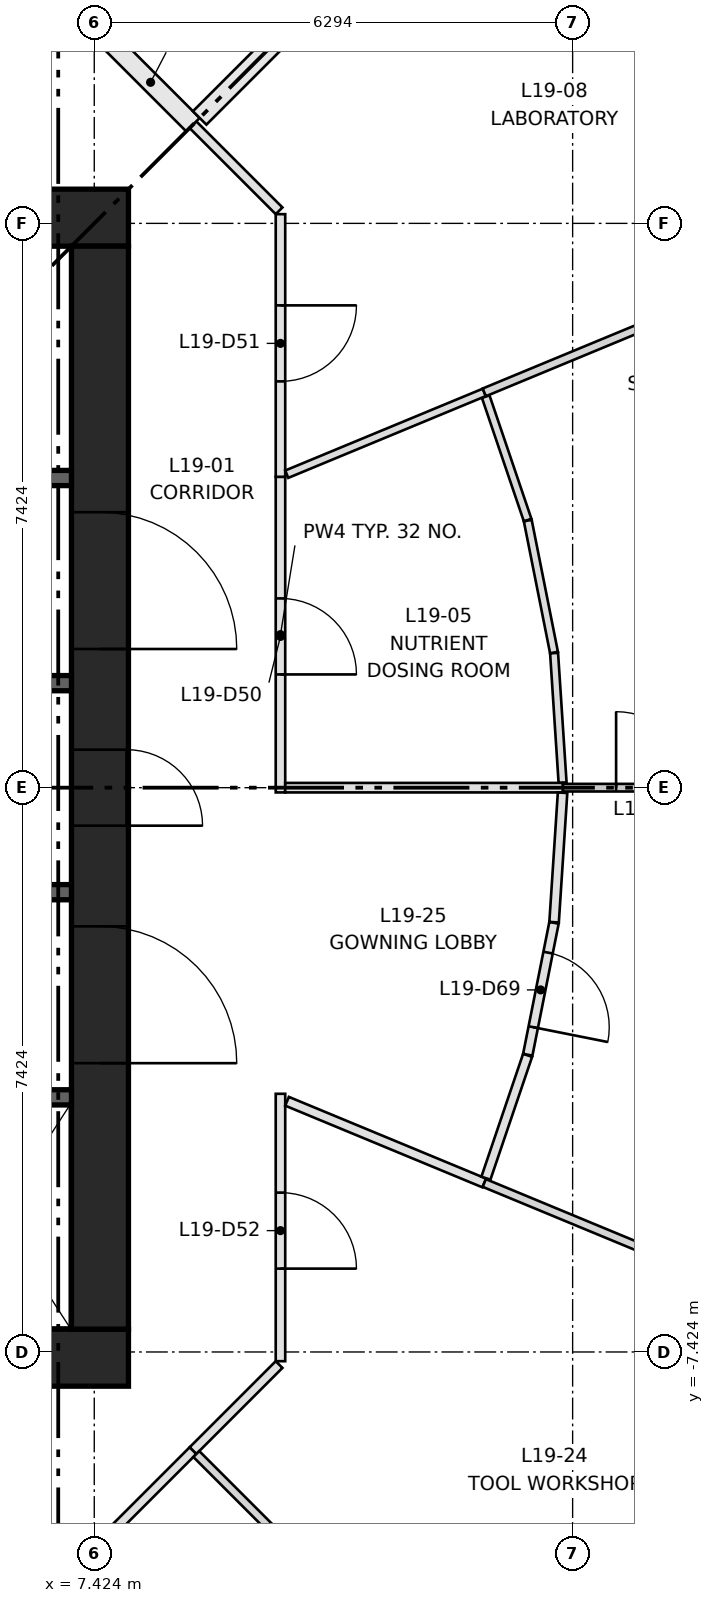
"""IFC4 building model, lengths in metres.
Left out: names, types, materials, properties, quantities, classifications, styles, units other than length and angle.
Written with IfcOpenShell. Run it as: python <this file> out.ifc"""

import sys

from ifc_helpers import new_model, si_unit, direction, frame, frame_2d, origin, place, context, subcontext, project, spatial, rectangle, extrude, element, fill, save


model = new_model("IFC4")
c1 = context("Model", 3, precision=1e-05, world=origin(), true_north=direction((0.0, 1.0)))
c2 = subcontext(c1, "Body", "Model", "MODEL_VIEW")
j1 = project(units=[si_unit("LENGTHUNIT", "METRE"), si_unit("PLANEANGLEUNIT", "RADIAN")], contexts=[c1])
p1 = place(None, origin())
s1 = spatial("IfcSite", under=j1, at=p1, CompositionType="ELEMENT")
p2 = place(p1, origin())
s2 = spatial("IfcBuilding", under=s1, at=p2, CompositionType="ELEMENT")
p3 = place(p2, frame((0.0, 0.0, 76.4)))
s3 = spatial("IfcBuildingStorey", under=s2, at=p3, CompositionType="ELEMENT", Elevation=76.4)
for number, where, z_axis, x_axis in (
    (1, (-7.874, -7.499, 0.0), (0.0, 0.0, 1.0), (1.0, 0.0, 0.0)),
    (2, (-7.874, 7.499, 0.0), (0.0, 0.0, 1.0), (1.0, 0.0, 0.0)),
):
    element("IfcWall", number, at=place(p3, frame(where, z_axis=z_axis, x_axis=x_axis)), inside=s3, PredefinedType="SHEAR", context=c2, shape_type="SweptSolid", body=[
        extrude(rectangle(XDim=15.748, YDim=0.75, at=frame_2d((7.874, 0.0))), origin(), (0.0, 0.0, 1.0), 3.65),
    ])
p4 = place(p3, frame((7.499, -7.124, 0.0), z_axis=(0.0, 0.0, 1.0), x_axis=(0.0, 1.0, 0.0)))
e3 = element("IfcWall", 3, at=p4, inside=s3, PredefinedType="SHEAR", context=c2, shape_type="SweptSolid", body=[
    extrude(rectangle(XDim=14.248, YDim=0.75, at=frame_2d((7.124, 0.0))), origin(), (0.0, 0.0, 1.0), 3.65),
])
p5 = place(p4, frame((6.624, 0.0, 0.0)))
e4 = element("IfcOpeningElement", 4, at=p5, cuts=e3, PredefinedType="OPENING", context=c2, shape_type="SweptSolid", body=[
    extrude(rectangle(XDim=1.0, YDim=2.1, at=frame_2d((0.5, 1.05))), frame((0.0, 0.385, 0.0), z_axis=(0.0, -1.0, 0.0), x_axis=(1.0, 0.0, 0.0)), (0.0, 0.0, 1.0), 0.77),
])
p6 = place(p4, frame((3.5, 0.0, 0.0)))
e5 = element("IfcOpeningElement", 5, at=p6, cuts=e3, PredefinedType="OPENING", context=c2, shape_type="SweptSolid", body=[
    extrude(rectangle(XDim=1.8, YDim=2.1, at=frame_2d((0.9, 1.05))), frame((0.0, 0.385, 0.0), z_axis=(0.0, -1.0, 0.0), x_axis=(1.0, 0.0, 0.0)), (0.0, 0.0, 1.0), 0.77),
])
p7 = place(p4, frame((8.948, 0.0, 0.0)))
e6 = element("IfcOpeningElement", 6, at=p7, cuts=e3, PredefinedType="OPENING", context=c2, shape_type="SweptSolid", body=[
    extrude(rectangle(XDim=1.8, YDim=2.1, at=frame_2d((0.9, 1.05))), frame((0.0, 0.385, 0.0), z_axis=(0.0, -1.0, 0.0), x_axis=(1.0, 0.0, 0.0)), (0.0, 0.0, 1.0), 0.77),
])
p8 = place(p3, frame((-7.124, -4.074, 0.0), z_axis=(0.0, 0.0, 1.0), x_axis=(1.0, 0.0, 0.0)))
e7 = element("IfcWall", 7, at=p8, inside=s3, PredefinedType="SHEAR", context=c2, shape_type="SweptSolid", body=[
    extrude(rectangle(XDim=14.248, YDim=0.2, at=frame_2d((7.124, 0.0))), origin(), (0.0, 0.0, 1.0), 3.3),
])
p9 = place(p8, frame((1.069, 0.0, 0.0)))
e8 = element("IfcOpeningElement", 8, at=p9, cuts=e7, PredefinedType="OPENING", context=c2, shape_type="SweptSolid", body=[
    extrude(rectangle(XDim=1.1, YDim=2.1, at=frame_2d((0.55, 1.05))), frame((0.0, 0.11, 0.0), z_axis=(0.0, -1.0, 0.0), x_axis=(1.0, 0.0, 0.0)), (0.0, 0.0, 1.0), 0.22),
])
p10 = place(p8, frame((4.206, 0.0, 0.0)))
e9 = element("IfcOpeningElement", 9, at=p10, cuts=e7, PredefinedType="OPENING", context=c2, shape_type="SweptSolid", body=[
    extrude(rectangle(XDim=1.1, YDim=2.1, at=frame_2d((0.55, 1.05))), frame((0.0, 0.11, 0.0), z_axis=(0.0, -1.0, 0.0), x_axis=(1.0, 0.0, 0.0)), (0.0, 0.0, 1.0), 0.22),
])
p11 = place(p8, frame((6.808, 0.0, 0.0)))
e10 = element("IfcOpeningElement", 10, at=p11, cuts=e7, PredefinedType="OPENING", context=c2, shape_type="SweptSolid", body=[
    extrude(rectangle(XDim=1.0, YDim=2.1, at=frame_2d((0.5, 1.05))), frame((0.0, 0.11, 0.0), z_axis=(0.0, -1.0, 0.0), x_axis=(1.0, 0.0, 0.0)), (0.0, 0.0, 1.0), 0.22),
])
p12 = place(p8, frame((8.777, 0.0, 0.0)))
e11 = element("IfcOpeningElement", 11, at=p12, cuts=e7, PredefinedType="OPENING", context=c2, shape_type="SweptSolid", body=[
    extrude(rectangle(XDim=1.0, YDim=2.1, at=frame_2d((0.5, 1.05))), frame((0.0, 0.11, 0.0), z_axis=(0.0, -1.0, 0.0), x_axis=(1.0, 0.0, 0.0)), (0.0, 0.0, 1.0), 0.22),
])
p13 = place(p8, frame((10.745, 0.0, 0.0)))
e12 = element("IfcOpeningElement", 12, at=p13, cuts=e7, PredefinedType="OPENING", context=c2, shape_type="SweptSolid", body=[
    extrude(rectangle(XDim=1.0, YDim=2.1, at=frame_2d((0.5, 1.05))), frame((0.0, 0.11, 0.0), z_axis=(0.0, -1.0, 0.0), x_axis=(1.0, 0.0, 0.0)), (0.0, 0.0, 1.0), 0.22),
])
p14 = place(p8, frame((12.714, 0.0, 0.0)))
e13 = element("IfcOpeningElement", 13, at=p14, cuts=e7, PredefinedType="OPENING", context=c2, shape_type="SweptSolid", body=[
    extrude(rectangle(XDim=1.0, YDim=2.1, at=frame_2d((0.5, 1.05))), frame((0.0, 0.11, 0.0), z_axis=(0.0, -1.0, 0.0), x_axis=(1.0, 0.0, 0.0)), (0.0, 0.0, 1.0), 0.22),
])
p15 = place(p3, frame((0.0, 4.074, 0.0), z_axis=(0.0, 0.0, 1.0), x_axis=(1.0, 0.0, 0.0)))
e14 = element("IfcWall", 14, at=p15, inside=s3, PredefinedType="SHEAR", context=c2, shape_type="SweptSolid", body=[
    extrude(rectangle(XDim=7.124, YDim=0.2, at=frame_2d((3.562, 0.0))), origin(), (0.0, 0.0, 1.0), 3.3),
])
p16 = place(p15, frame((0.753, 0.0, 0.0)))
e15 = element("IfcOpeningElement", 15, at=p16, cuts=e14, PredefinedType="OPENING", context=c2, shape_type="SweptSolid", body=[
    extrude(rectangle(XDim=1.0, YDim=2.1, at=frame_2d((0.5, 1.05))), frame((0.0, 0.11, 0.0), z_axis=(0.0, -1.0, 0.0), x_axis=(1.0, 0.0, 0.0)), (0.0, 0.0, 1.0), 0.22),
])
p17 = place(p15, frame((2.685, 0.0, 0.0)))
e16 = element("IfcOpeningElement", 16, at=p17, cuts=e14, PredefinedType="OPENING", context=c2, shape_type="SweptSolid", body=[
    extrude(rectangle(XDim=0.95, YDim=2.1, at=frame_2d((0.475, 1.05))), frame((0.0, 0.11, 0.0), z_axis=(0.0, -1.0, 0.0), x_axis=(1.0, 0.0, 0.0)), (0.0, 0.0, 1.0), 0.22),
])
p18 = place(p15, frame((4.06, 0.0, 0.0)))
e17 = element("IfcOpeningElement", 17, at=p18, cuts=e14, PredefinedType="OPENING", context=c2, shape_type="SweptSolid", body=[
    extrude(rectangle(XDim=1.0, YDim=2.1, at=frame_2d((0.5, 1.05))), frame((0.0, 0.11, 0.0), z_axis=(0.0, -1.0, 0.0), x_axis=(1.0, 0.0, 0.0)), (0.0, 0.0, 1.0), 0.22),
])
p19 = place(p15, frame((5.79, 0.0, 0.0)))
e18 = element("IfcOpeningElement", 18, at=p19, cuts=e14, PredefinedType="OPENING", context=c2, shape_type="SweptSolid", body=[
    extrude(rectangle(XDim=0.8, YDim=2.1, at=frame_2d((0.4, 1.05))), frame((0.0, 0.11, 0.0), z_axis=(0.0, -1.0, 0.0), x_axis=(1.0, 0.0, 0.0)), (0.0, 0.0, 1.0), 0.22),
])
for number, where, z_axis, x_axis in (
    (19, (4.374, -1.375, 0.0), (0.0, 0.0, 1.0), (1.0, 0.0, 0.0)),
    (20, (4.374, 1.375, 0.0), (0.0, 0.0, 1.0), (1.0, 0.0, 0.0)),
):
    element("IfcWall", number, at=place(p3, frame(where, z_axis=z_axis, x_axis=x_axis)), inside=s3, PredefinedType="SHEAR", context=c2, shape_type="SweptSolid", body=[
        extrude(rectangle(XDim=2.75, YDim=0.2, at=frame_2d((1.375, 0.0))), origin(), (0.0, 0.0, 1.0), 3.3),
    ])
p20 = place(p3, frame((9.874, 4.09, 0.0), z_axis=(0.0, 0.0, 1.0), x_axis=(0.0, -1.0, 0.0)))
e21 = element("IfcWall", 21, at=p20, inside=s3, PredefinedType="PARTITIONING", context=c2, shape_type="SweptSolid", body=[
    extrude(rectangle(XDim=4.152, YDim=0.125, at=frame_2d((2.076, 0.0))), origin(), (0.0, 0.0, 1.0), 3.3),
])
p21 = place(p20, frame((1.6, 0.0, 0.0)))
e22 = element("IfcOpeningElement", 22, at=p21, cuts=e21, PredefinedType="OPENING", context=c2, shape_type="SweptSolid", body=[
    extrude(rectangle(XDim=1.0, YDim=2.1, at=frame_2d((0.5, 1.05))), frame((0.0, 0.073, 0.0), z_axis=(0.0, -1.0, 0.0), x_axis=(1.0, 0.0, 0.0)), (0.0, 0.0, 1.0), 0.145),
])
p22 = place(p3, frame((8.722, 8.722, 0.0), z_axis=(0.0, 0.0, 1.0), x_axis=(0.70718294931, -0.707030604857, 0.0)))
e23 = element("IfcWall", 23, at=p22, inside=s3, PredefinedType="PARTITIONING", context=c2, shape_type="SweptSolid", body=[
    extrude(rectangle(XDim=1.603, YDim=0.125, at=frame_2d((0.801, 0.0))), origin(), (0.0, 0.0, 1.0), 3.3),
])
p23 = place(p3, frame((9.874, 7.545, 0.0), z_axis=(0.0, 0.0, 1.0), x_axis=(0.0, -1.0, 0.0)))
e24 = element("IfcWall", 24, at=p23, inside=s3, PredefinedType="PARTITIONING", context=c2, shape_type="SweptSolid", body=[
    extrude(rectangle(XDim=3.455, YDim=0.125, at=frame_2d((1.728, 0.0))), origin(), (0.0, 0.0, 1.0), 3.3),
])
p24 = place(p23, frame((1.2, 0.0, 0.0)))
e25 = element("IfcOpeningElement", 25, at=p24, cuts=e24, PredefinedType="OPENING", context=c2, shape_type="SweptSolid", body=[
    extrude(rectangle(XDim=1.0, YDim=2.1, at=frame_2d((0.5, 1.05))), frame((0.0, 0.073, 0.0), z_axis=(0.0, -1.0, 0.0), x_axis=(1.0, 0.0, 0.0)), (0.0, 0.0, 1.0), 0.145),
])
p25 = place(p3, frame((9.856, -7.589, 0.0), z_axis=(0.0, 0.0, 1.0), x_axis=(-0.70718294931, -0.707030604857, 0.0)))
e26 = element("IfcWall", 26, at=p25, inside=s3, PredefinedType="PARTITIONING", context=c2, shape_type="SweptSolid", body=[
    extrude(rectangle(XDim=1.603, YDim=0.125, at=frame_2d((0.801, 0.0))), origin(), (0.0, 0.0, 1.0), 3.3),
])
p26 = place(p3, frame((9.874, -4.027, 0.0), z_axis=(0.0, 0.0, 1.0), x_axis=(0.0, -1.0, 0.0)))
e27 = element("IfcWall", 27, at=p26, inside=s3, PredefinedType="PARTITIONING", context=c2, shape_type="SweptSolid", body=[
    extrude(rectangle(XDim=3.518, YDim=0.125, at=frame_2d((1.759, 0.0))), origin(), (0.0, 0.0, 1.0), 3.3),
])
p27 = place(p26, frame((1.3, 0.0, 0.0)))
e28 = element("IfcOpeningElement", 28, at=p27, cuts=e27, PredefinedType="OPENING", context=c2, shape_type="SweptSolid", body=[
    extrude(rectangle(XDim=1.0, YDim=2.1, at=frame_2d((0.5, 1.05))), frame((0.0, 0.073, 0.0), z_axis=(0.0, -1.0, 0.0), x_axis=(1.0, 0.0, 0.0)), (0.0, 0.0, 1.0), 0.145),
])
p28 = place(p3, frame((7.608, 9.837, 0.0), z_axis=(0.0, 0.0, 1.0), x_axis=(0.707029353672, -0.707184200224, 0.0)))
e29 = element("IfcWall", 29, at=p28, inside=s3, PredefinedType="PARTITIONING", context=c2, shape_type="SweptSolid", body=[
    extrude(rectangle(XDim=1.577, YDim=0.25, at=frame_2d((0.788, 0.0))), origin(), (0.0, 0.0, 1.0), 3.3),
])
p29 = place(p3, frame((8.722, -8.722, 0.0), z_axis=(0.0, 0.0, 1.0), x_axis=(-0.707030604857, -0.70718294931, 0.0)))
e30 = element("IfcWall", 30, at=p29, inside=s3, PredefinedType="PARTITIONING", context=c2, shape_type="SweptSolid", body=[
    extrude(rectangle(XDim=1.603, YDim=0.125, at=frame_2d((0.801, 0.0))), origin(), (0.0, 0.0, 1.0), 3.3),
])
p30 = place(p3, frame((12.574, 5.145, 0.0), z_axis=(0.0, 0.0, 1.0), x_axis=(0.32147409201, -0.946918374606, 0.0)))
e31 = element("IfcWall", 31, at=p30, inside=s3, PredefinedType="PARTITIONING", context=c2, shape_type="SweptSolid", body=[
    extrude(rectangle(XDim=1.716, YDim=0.105, at=frame_2d((0.858, 0.0))), origin(), (0.0, 0.0, 1.0), 3.3),
])
p31 = place(p3, frame((13.128, 3.514, 0.0), z_axis=(0.0, 0.0, 1.0), x_axis=(0.194975762397, -0.980808060773, 0.0)))
e32 = element("IfcWall", 32, at=p31, inside=s3, PredefinedType="PARTITIONING", context=c2, shape_type="SweptSolid", body=[
    extrude(rectangle(XDim=1.771, YDim=0.105, at=frame_2d((0.885, 0.0))), origin(), (0.0, 0.0, 1.0), 3.3),
])
p32 = place(p3, frame((13.474, 1.771, 0.0), z_axis=(0.0, 0.0, 1.0), x_axis=(0.065456571456, -0.997855419013, 0.0)))
e33 = element("IfcWall", 33, at=p32, inside=s3, PredefinedType="PARTITIONING", context=c2, shape_type="SweptSolid", body=[
    extrude(rectangle(XDim=1.708, YDim=0.105, at=frame_2d((0.854, 0.0))), origin(), (0.0, 0.0, 1.0), 3.3),
])
p33 = place(p3, frame((9.957, 4.124, 0.0), z_axis=(0.0, 0.0, 1.0), x_axis=(0.923858155589, 0.382735036745, 0.0)))
e34 = element("IfcWall", 34, at=p33, inside=s3, PredefinedType="PARTITIONING", context=c2, shape_type="SweptSolid", body=[
    extrude(rectangle(XDim=2.813, YDim=0.105, at=frame_2d((1.406, 0.0))), origin(), (0.0, 0.0, 1.0), 3.3),
])
p34 = place(p3, frame((13.59, 0.0, 0.0), z_axis=(0.0, 0.0, 1.0), x_axis=(-1.0, 0.0, 0.0)))
e35 = element("IfcWall", 35, at=p34, inside=s3, PredefinedType="PARTITIONING", context=c2, shape_type="SweptSolid", body=[
    extrude(rectangle(XDim=3.654, YDim=0.125, at=frame_2d((1.827, 0.0))), origin(), (0.0, 0.0, 1.0), 3.3),
])
p35 = place(p3, frame((12.555, 5.201, 0.0), z_axis=(0.0, 0.0, 1.0), x_axis=(0.923886856779, 0.38266574954, 0.0)))
e36 = element("IfcWall", 36, at=p35, inside=s3, PredefinedType="PARTITIONING", context=c2, shape_type="SweptSolid", body=[
    extrude(rectangle(XDim=4.67, YDim=0.11, at=frame_2d((2.335, 0.0))), origin(), (0.0, 0.0, 1.0), 3.3),
])
p36 = place(p3, frame((13.59, 0.0, 0.0), z_axis=(0.0, 0.0, 1.0), x_axis=(1.0, 0.0, 0.0)))
e37 = element("IfcWall", 37, at=p36, inside=s3, PredefinedType="PARTITIONING", context=c2, shape_type="SweptSolid", body=[
    extrude(rectangle(XDim=4.67, YDim=0.1, at=frame_2d((2.335, 0.0))), origin(), (0.0, 0.0, 1.0), 3.3),
])
p37 = place(p36, frame((0.7, 0.0, 0.0)))
e38 = element("IfcOpeningElement", 38, at=p37, cuts=e37, PredefinedType="OPENING", context=c2, shape_type="SweptSolid", body=[
    extrude(rectangle(XDim=1.0, YDim=2.1, at=frame_2d((0.5, 1.05))), frame((0.0, 0.06, 0.0), z_axis=(0.0, -1.0, 0.0), x_axis=(1.0, 0.0, 0.0)), (0.0, 0.0, 1.0), 0.12),
])
p38 = place(p3, frame((12.912, 12.912, 0.0), z_axis=(0.0, 0.0, 1.0), x_axis=(-0.707106781187, -0.707106781187, 0.0)))
e39 = element("IfcWall", 39, at=p38, inside=s3, PredefinedType="PARTITIONING", context=c2, shape_type="SweptSolid", body=[
    extrude(rectangle(XDim=5.8, YDim=0.25, at=frame_2d((2.9, 0.0))), origin(), (0.0, 0.0, 1.0), 3.3),
])
p39 = place(p3, frame((8.767, -8.767, 0.0), z_axis=(0.0, 0.0, 1.0), x_axis=(0.707106781187, -0.707106781187, 0.0)))
e40 = element("IfcWall", 40, at=p39, inside=s3, PredefinedType="PARTITIONING", context=c2, shape_type="SweptSolid", body=[
    extrude(rectangle(XDim=5.862, YDim=0.11, at=frame_2d((2.931, 0.0))), origin(), (0.0, 0.0, 1.0), 3.3),
])
p40 = place(p3, frame((9.96, -4.126, 0.0), z_axis=(0.0, 0.0, 1.0), x_axis=(0.923869574034, -0.382707473372, 0.0)))
e41 = element("IfcWall", 41, at=p40, inside=s3, PredefinedType="PARTITIONING", context=c2, shape_type="SweptSolid", body=[
    extrude(rectangle(XDim=2.809, YDim=0.125, at=frame_2d((1.404, 0.0))), origin(), (0.0, 0.0, 1.0), 3.3),
])
p41 = place(p3, frame((12.555, -5.201, 0.0), z_axis=(0.0, 0.0, 1.0), x_axis=(0.923886856779, -0.38266574954, 0.0)))
e42 = element("IfcWall", 42, at=p41, inside=s3, PredefinedType="PARTITIONING", context=c2, shape_type="SweptSolid", body=[
    extrude(rectangle(XDim=4.67, YDim=0.11, at=frame_2d((2.335, 0.0))), origin(), (0.0, 0.0, 1.0), 3.3),
])
p42 = place(p3, frame((13.125, -3.521, 0.0), z_axis=(0.0, 0.0, 1.0), x_axis=(-0.321415455279, -0.946938279461, 0.0)))
e43 = element("IfcWall", 43, at=p42, inside=s3, PredefinedType="PARTITIONING", context=c2, shape_type="SweptSolid", body=[
    extrude(rectangle(XDim=1.707, YDim=0.125, at=frame_2d((0.854, 0.0))), origin(), (0.0, 0.0, 1.0), 3.3),
])
p43 = place(p3, frame((13.473, -1.778, 0.0), z_axis=(0.0, 0.0, 1.0), x_axis=(-0.195081294896, -0.980787075966, 0.0)))
e44 = element("IfcWall", 44, at=p43, inside=s3, PredefinedType="PARTITIONING", context=c2, shape_type="SweptSolid", body=[
    extrude(rectangle(XDim=1.77, YDim=0.125, at=frame_2d((0.885, 0.0))), origin(), (0.0, 0.0, 1.0), 3.3),
])
p44 = place(p43, frame((0.4, 0.0, 0.0)))
e45 = element("IfcOpeningElement", 45, at=p44, cuts=e44, PredefinedType="OPENING", context=c2, shape_type="SweptSolid", body=[
    extrude(rectangle(XDim=1.0, YDim=2.1, at=frame_2d((0.5, 1.05))), frame((0.0, 0.073, 0.0), z_axis=(0.0, -1.0, 0.0), x_axis=(1.0, 0.0, 0.0)), (0.0, 0.0, 1.0), 0.145),
])
p45 = place(p3, frame((13.586, -0.067, 0.0), z_axis=(0.0, 0.0, 1.0), x_axis=(-0.06537019983, -0.997861081, 0.0)))
e46 = element("IfcWall", 46, at=p45, inside=s3, PredefinedType="PARTITIONING", context=c2, shape_type="SweptSolid", body=[
    extrude(rectangle(XDim=1.707, YDim=0.125, at=frame_2d((0.854, 0.0))), origin(), (0.0, 0.0, 1.0), 3.3),
])
p46 = place(p5, frame((1.0, 0.0, 0.0), z_axis=(0.0, 0.0, 1.0), x_axis=(-1.0, 0.0, 0.0)))
e47 = element("IfcDoor", 47, at=p46, inside=s3, OperationType="SINGLE_SWING_LEFT", PredefinedType="DOOR", context=c2, shape_type="SweptSolid", body=[
    extrude(rectangle(XDim=1.0, YDim=2.1, at=frame_2d((0.5, 1.05))), frame((0.0, 0.375, 0.0), z_axis=(0.0, -1.0, 0.0), x_axis=(1.0, 0.0, 0.0)), (0.0, 0.0, 1.0), 0.05),
])
fill(e4, e47)
p47 = place(p6, frame((1.8, 0.0, 0.0), z_axis=(0.0, 0.0, 1.0), x_axis=(-1.0, 0.0, 0.0)))
e48 = element("IfcDoor", 48, at=p47, inside=s3, OperationType="DOUBLE_DOOR_SINGLE_SWING", PredefinedType="DOOR", context=c2, shape_type="SweptSolid", body=[
    extrude(rectangle(XDim=1.8, YDim=2.1, at=frame_2d((0.9, 1.05))), frame((0.0, 0.025, 0.0), z_axis=(0.0, -1.0, 0.0), x_axis=(1.0, 0.0, 0.0)), (0.0, 0.0, 1.0), 0.05),
])
fill(e5, e48)
p48 = place(p7, frame((1.8, 0.0, 0.0), z_axis=(0.0, 0.0, 1.0), x_axis=(-1.0, 0.0, 0.0)))
e49 = element("IfcDoor", 49, at=p48, inside=s3, OperationType="DOUBLE_DOOR_SINGLE_SWING", PredefinedType="DOOR", context=c2, shape_type="SweptSolid", body=[
    extrude(rectangle(XDim=1.8, YDim=2.1, at=frame_2d((0.9, 1.05))), frame((0.0, 0.025, 0.0), z_axis=(0.0, -1.0, 0.0), x_axis=(1.0, 0.0, 0.0)), (0.0, 0.0, 1.0), 0.05),
])
fill(e6, e49)
p49 = place(p21, origin())
e50 = element("IfcDoor", 50, at=p49, inside=s3, OperationType="SINGLE_SWING_RIGHT", PredefinedType="DOOR", context=c2, shape_type="SweptSolid", body=[
    extrude(rectangle(XDim=1.0, YDim=2.1, at=frame_2d((0.5, 1.05))), frame((0.0, 0.025, 0.0), z_axis=(0.0, -1.0, 0.0), x_axis=(1.0, 0.0, 0.0)), (0.0, 0.0, 1.0), 0.05),
])
fill(e22, e50)
p50 = place(p24, origin())
e51 = element("IfcDoor", 51, at=p50, inside=s3, OperationType="SINGLE_SWING_LEFT", PredefinedType="DOOR", context=c2, shape_type="SweptSolid", body=[
    extrude(rectangle(XDim=1.0, YDim=2.1, at=frame_2d((0.5, 1.05))), frame((0.0, 0.025, 0.0), z_axis=(0.0, -1.0, 0.0), x_axis=(1.0, 0.0, 0.0)), (0.0, 0.0, 1.0), 0.05),
])
fill(e25, e51)
p51 = place(p27, origin())
e52 = element("IfcDoor", 52, at=p51, inside=s3, OperationType="SINGLE_SWING_RIGHT", PredefinedType="DOOR", context=c2, shape_type="SweptSolid", body=[
    extrude(rectangle(XDim=1.0, YDim=2.1, at=frame_2d((0.5, 1.05))), frame((0.0, 0.025, 0.0), z_axis=(0.0, -1.0, 0.0), x_axis=(1.0, 0.0, 0.0)), (0.0, 0.0, 1.0), 0.05),
])
fill(e28, e52)
p52 = place(p37, origin())
e53 = element("IfcDoor", 53, at=p52, inside=s3, OperationType="SINGLE_SWING_LEFT", PredefinedType="DOOR", context=c2, shape_type="SweptSolid", body=[
    extrude(rectangle(XDim=1.0, YDim=2.1, at=frame_2d((0.5, 1.05))), frame((0.0, 0.025, 0.0), z_axis=(0.0, -1.0, 0.0), x_axis=(1.0, 0.0, 0.0)), (0.0, 0.0, 1.0), 0.05),
])
fill(e38, e53)
p53 = place(p44, origin())
e54 = element("IfcDoor", 54, at=p53, inside=s3, OperationType="SINGLE_SWING_RIGHT", PredefinedType="DOOR", context=c2, shape_type="SweptSolid", body=[
    extrude(rectangle(XDim=1.0, YDim=2.1, at=frame_2d((0.5, 1.05))), frame((0.0, 0.025, 0.0), z_axis=(0.0, -1.0, 0.0), x_axis=(1.0, 0.0, 0.0)), (0.0, 0.0, 1.0), 0.05),
])
fill(e45, e54)
save(model, sys.argv[1])
